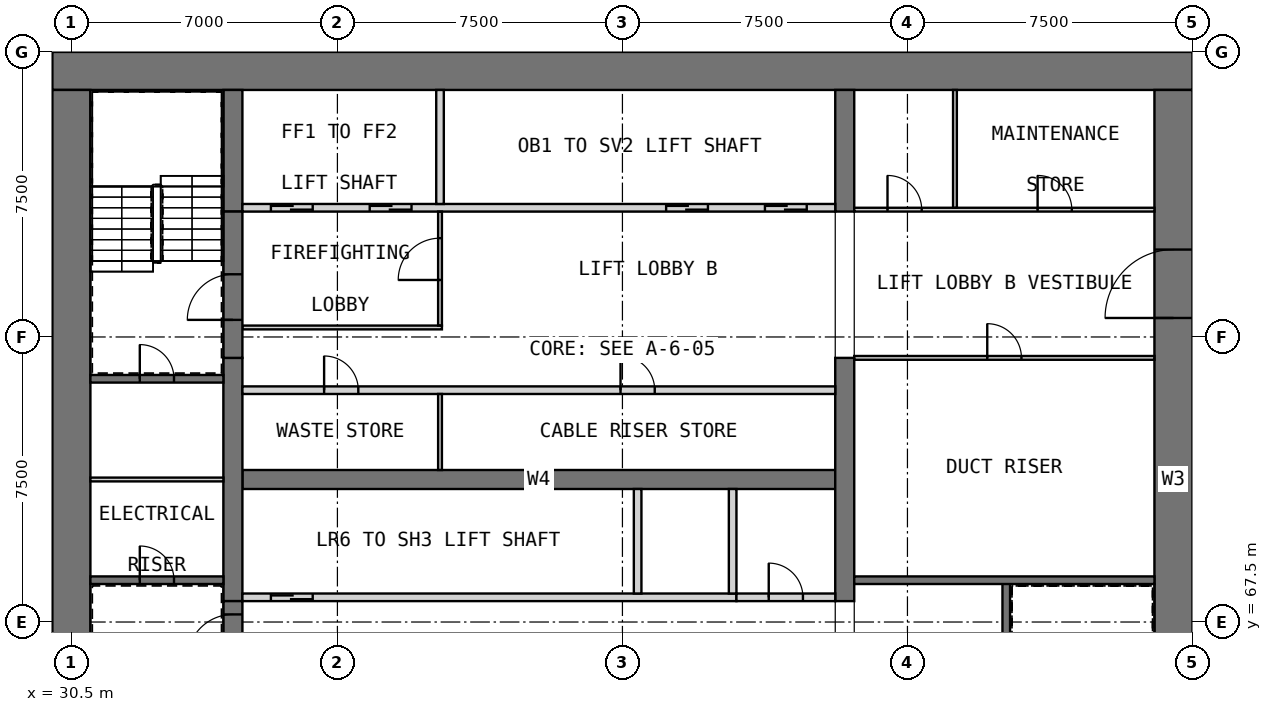
"""IFC4 building model, lengths in metres.
Left out: names, types, materials, properties, quantities, classifications, styles, units other than length and angle.
Written with IfcOpenShell. Run it as: python <this file> out.ifc"""

import sys

from ifc_helpers import new_model, si_unit, direction, frame, frame_2d, origin, place, context, subcontext, project, spatial, rectangle, extrude, element, fill, save


model = new_model("IFC4")
c1 = context("Model", 3, precision=1e-05, world=origin(), true_north=direction((0.0, 1.0)))
c2 = subcontext(c1, "Body", "Model", "MODEL_VIEW")
j1 = project(units=[si_unit("LENGTHUNIT", "METRE"), si_unit("PLANEANGLEUNIT", "RADIAN")], contexts=[c1])
p1 = place(None, origin())
s1 = spatial("IfcSite", under=j1, at=p1, CompositionType="ELEMENT")
p2 = place(p1, origin())
s2 = spatial("IfcBuilding", under=s1, at=p2, CompositionType="ELEMENT")
p3 = place(p2, frame((0.0, 0.0, 13.5)))
s3 = spatial("IfcBuildingStorey", under=s2, at=p3, CompositionType="ELEMENT", Elevation=13.5)
p4 = place(p3, frame((30.0, 82.0, 0.0), z_axis=(0.0, 0.0, 1.0), x_axis=(1.0, 0.0, 0.0)))
e1 = element("IfcWall", 1, at=p4, inside=s3, PredefinedType="SHEAR", context=c2, shape_type="SweptSolid", body=[
    extrude(rectangle(XDim=30.0, YDim=1.0, at=frame_2d((15.0, 0.0))), origin(), (0.0, 0.0, 1.0), 5.0),
])
p5 = place(p3, frame((30.5, 61.0, 0.0), z_axis=(0.0, 0.0, 1.0), x_axis=(0.0, 1.0, 0.0)))
e2 = element("IfcWall", 2, at=p5, inside=s3, PredefinedType="SHEAR", context=c2, shape_type="SweptSolid", body=[
    extrude(rectangle(XDim=20.5, YDim=1.0, at=frame_2d((10.25, 0.0))), origin(), (0.0, 0.0, 1.0), 5.0),
])
p6 = place(p3, frame((59.5, 61.0, 0.0), z_axis=(0.0, 0.0, 1.0), x_axis=(0.0, 1.0, 0.0)))
e3 = element("IfcWall", 3, at=p6, inside=s3, PredefinedType="SHEAR", context=c2, shape_type="SweptSolid", body=[
    extrude(rectangle(XDim=20.5, YDim=1.0, at=frame_2d((10.25, 0.0))), origin(), (0.0, 0.0, 1.0), 5.0),
])
p7 = place(p6, frame((14.5, 0.0, 0.0)))
e4 = element("IfcOpeningElement", 4, at=p7, cuts=e3, PredefinedType="OPENING", context=c2, shape_type="SweptSolid", body=[
    extrude(rectangle(XDim=1.8, YDim=2.1, at=frame_2d((0.9, 1.05))), frame((0.0, 0.51, 0.0), z_axis=(0.0, -1.0, 0.0), x_axis=(1.0, 0.0, 0.0)), (0.0, 0.0, 1.0), 1.02),
])
p8 = place(p3, frame((35.0, 71.25, 0.0), z_axis=(0.0, 0.0, 1.0), x_axis=(1.0, 0.0, 0.0)))
e5 = element("IfcWall", 5, at=p8, inside=s3, PredefinedType="SHEAR", context=c2, shape_type="SweptSolid", body=[
    extrude(rectangle(XDim=15.6, YDim=0.5, at=frame_2d((7.8, 0.0))), origin(), (0.0, 0.0, 1.0), 5.0),
])
p9 = place(p3, frame((34.75, 68.05, 0.0), z_axis=(0.0, 0.0, 1.0), x_axis=(0.0, 1.0, 0.0)))
e6 = element("IfcWall", 6, at=p9, inside=s3, PredefinedType="SHEAR", context=c2, shape_type="SweptSolid", body=[
    extrude(rectangle(XDim=6.4, YDim=0.5, at=frame_2d((3.2, 0.0))), origin(), (0.0, 0.0, 1.0), 5.0),
])
p10 = place(p3, frame((34.75, 78.3, 0.0), z_axis=(0.0, 0.0, 1.0), x_axis=(0.0, 1.0, 0.0)))
e7 = element("IfcWall", 7, at=p10, inside=s3, PredefinedType="SHEAR", context=c2, shape_type="SweptSolid", body=[
    extrude(rectangle(XDim=3.2, YDim=0.5, at=frame_2d((1.6, 0.0))), origin(), (0.0, 0.0, 1.0), 5.0),
])
p11 = place(p3, frame((50.85, 68.05, 0.0), z_axis=(0.0, 0.0, 1.0), x_axis=(0.0, 1.0, 0.0)))
e8 = element("IfcWall", 8, at=p11, inside=s3, PredefinedType="SHEAR", context=c2, shape_type="SweptSolid", body=[
    extrude(rectangle(XDim=6.4, YDim=0.5, at=frame_2d((3.2, 0.0))), origin(), (0.0, 0.0, 1.0), 5.0),
])
p12 = place(p3, frame((50.85, 78.3, 0.0), z_axis=(0.0, 0.0, 1.0), x_axis=(0.0, 1.0, 0.0)))
e9 = element("IfcWall", 9, at=p12, inside=s3, PredefinedType="SHEAR", context=c2, shape_type="SweptSolid", body=[
    extrude(rectangle(XDim=3.2, YDim=0.5, at=frame_2d((1.6, 0.0))), origin(), (0.0, 0.0, 1.0), 5.0),
])
p13 = place(p3, frame((35.0, 68.15, 0.0), z_axis=(0.0, 0.0, 1.0), x_axis=(1.0, 0.0, 0.0)))
e10 = element("IfcWall", 10, at=p13, inside=s3, PredefinedType="SOLIDWALL", context=c2, shape_type="SweptSolid", body=[
    extrude(rectangle(XDim=13.0, YDim=0.2, at=frame_2d((6.5, 0.0))), origin(), (0.0, 0.0, 1.0), 5.0),
])
p14 = place(p13, frame((0.75, 0.0, 0.0)))
e11 = element("IfcOpeningElement", 11, at=p14, cuts=e10, PredefinedType="OPENING", context=c2, shape_type="SweptSolid", body=[
    extrude(rectangle(XDim=1.1, YDim=2.1, at=frame_2d((0.55, 1.05))), frame((0.0, 0.11, 0.0), z_axis=(0.0, -1.0, 0.0), x_axis=(1.0, 0.0, 0.0)), (0.0, 0.0, 1.0), 0.22),
])
for number, where, z_axis, x_axis in (
    (12, (45.4, 68.25, 0.0), (0.0, 0.0, 1.0), (0.0, 1.0, 0.0)),
    (13, (47.9, 68.25, 0.0), (0.0, 0.0, 1.0), (0.0, 1.0, 0.0)),
):
    element("IfcWall", number, at=place(p3, frame(where, z_axis=z_axis, x_axis=x_axis)), inside=s3, PredefinedType="SOLIDWALL", context=c2, shape_type="SweptSolid", body=[
        extrude(rectangle(XDim=2.75, YDim=0.2, at=frame_2d((1.375, 0.0))), origin(), (0.0, 0.0, 1.0), 5.0),
    ])
p15 = place(p3, frame((48.0, 68.15, 0.0), z_axis=(0.0, 0.0, 1.0), x_axis=(1.0, 0.0, 0.0)))
e14 = element("IfcWall", 14, at=p15, inside=s3, PredefinedType="PARTITIONING", context=c2, shape_type="SweptSolid", body=[
    extrude(rectangle(XDim=2.6, YDim=0.2, at=frame_2d((1.3, 0.0))), origin(), (0.0, 0.0, 1.0), 4.7),
])
p16 = place(p15, frame((0.85, 0.0, 0.0)))
e15 = element("IfcOpeningElement", 15, at=p16, cuts=e14, PredefinedType="OPENING", context=c2, shape_type="SweptSolid", body=[
    extrude(rectangle(XDim=0.9, YDim=2.1, at=frame_2d((0.45, 1.05))), frame((0.0, 0.11, 0.0), z_axis=(0.0, -1.0, 0.0), x_axis=(1.0, 0.0, 0.0)), (0.0, 0.0, 1.0), 0.22),
])
p17 = place(p3, frame((35.0, 73.6, 0.0), z_axis=(0.0, 0.0, 1.0), x_axis=(1.0, 0.0, 0.0)))
e16 = element("IfcWall", 16, at=p17, inside=s3, PredefinedType="PARTITIONING", context=c2, shape_type="SweptSolid", body=[
    extrude(rectangle(XDim=15.6, YDim=0.2, at=frame_2d((7.8, 0.0))), origin(), (0.0, 0.0, 1.0), 4.7),
])
p18 = place(p17, frame((2.15, 0.0, 0.0)))
e17 = element("IfcOpeningElement", 17, at=p18, cuts=e16, PredefinedType="OPENING", context=c2, shape_type="SweptSolid", body=[
    extrude(rectangle(XDim=0.9, YDim=2.1, at=frame_2d((0.45, 1.05))), frame((0.0, 0.11, 0.0), z_axis=(0.0, -1.0, 0.0), x_axis=(1.0, 0.0, 0.0)), (0.0, 0.0, 1.0), 0.22),
])
p19 = place(p17, frame((9.95, 0.0, 0.0)))
e18 = element("IfcOpeningElement", 18, at=p19, cuts=e16, PredefinedType="OPENING", context=c2, shape_type="SweptSolid", body=[
    extrude(rectangle(XDim=0.9, YDim=2.1, at=frame_2d((0.45, 1.05))), frame((0.0, 0.11, 0.0), z_axis=(0.0, -1.0, 0.0), x_axis=(1.0, 0.0, 0.0)), (0.0, 0.0, 1.0), 0.22),
])
p20 = place(p3, frame((40.2, 71.5, 0.0), z_axis=(0.0, 0.0, 1.0), x_axis=(0.0, 1.0, 0.0)))
e19 = element("IfcWall", 19, at=p20, inside=s3, PredefinedType="PARTITIONING", context=c2, shape_type="SweptSolid", body=[
    extrude(rectangle(XDim=2.0, YDim=0.1, at=frame_2d((1.0, 0.0))), origin(), (0.0, 0.0, 1.0), 4.7),
])
p21 = place(p3, frame((35.0, 78.4, 0.0), z_axis=(0.0, 0.0, 1.0), x_axis=(1.0, 0.0, 0.0)))
e20 = element("IfcWall", 20, at=p21, inside=s3, PredefinedType="SOLIDWALL", context=c2, shape_type="SweptSolid", body=[
    extrude(rectangle(XDim=15.6, YDim=0.2, at=frame_2d((7.8, 0.0))), origin(), (0.0, 0.0, 1.0), 5.0),
])
p22 = place(p21, frame((0.75, 0.0, 0.0)))
e21 = element("IfcOpeningElement", 21, at=p22, cuts=e20, PredefinedType="OPENING", context=c2, shape_type="SweptSolid", body=[
    extrude(rectangle(XDim=1.1, YDim=2.1, at=frame_2d((0.55, 1.05))), frame((0.0, 0.11, 0.0), z_axis=(0.0, -1.0, 0.0), x_axis=(1.0, 0.0, 0.0)), (0.0, 0.0, 1.0), 0.22),
])
p23 = place(p21, frame((3.35, 0.0, 0.0)))
e22 = element("IfcOpeningElement", 22, at=p23, cuts=e20, PredefinedType="OPENING", context=c2, shape_type="SweptSolid", body=[
    extrude(rectangle(XDim=1.1, YDim=2.1, at=frame_2d((0.55, 1.05))), frame((0.0, 0.11, 0.0), z_axis=(0.0, -1.0, 0.0), x_axis=(1.0, 0.0, 0.0)), (0.0, 0.0, 1.0), 0.22),
])
p24 = place(p21, frame((11.15, 0.0, 0.0)))
e23 = element("IfcOpeningElement", 23, at=p24, cuts=e20, PredefinedType="OPENING", context=c2, shape_type="SweptSolid", body=[
    extrude(rectangle(XDim=1.1, YDim=2.1, at=frame_2d((0.55, 1.05))), frame((0.0, 0.11, 0.0), z_axis=(0.0, -1.0, 0.0), x_axis=(1.0, 0.0, 0.0)), (0.0, 0.0, 1.0), 0.22),
])
p25 = place(p21, frame((13.75, 0.0, 0.0)))
e24 = element("IfcOpeningElement", 24, at=p25, cuts=e20, PredefinedType="OPENING", context=c2, shape_type="SweptSolid", body=[
    extrude(rectangle(XDim=1.1, YDim=2.1, at=frame_2d((0.55, 1.05))), frame((0.0, 0.11, 0.0), z_axis=(0.0, -1.0, 0.0), x_axis=(1.0, 0.0, 0.0)), (0.0, 0.0, 1.0), 0.22),
])
p26 = place(p3, frame((40.2, 78.5, 0.0), z_axis=(0.0, 0.0, 1.0), x_axis=(0.0, 1.0, 0.0)))
e25 = element("IfcWall", 25, at=p26, inside=s3, PredefinedType="SOLIDWALL", context=c2, shape_type="SweptSolid", body=[
    extrude(rectangle(XDim=3.0, YDim=0.2, at=frame_2d((1.5, 0.0))), origin(), (0.0, 0.0, 1.0), 5.0),
])
p27 = place(p3, frame((35.0, 75.25, 0.0), z_axis=(0.0, 0.0, 1.0), x_axis=(1.0, 0.0, 0.0)))
e26 = element("IfcWall", 26, at=p27, inside=s3, PredefinedType="PARTITIONING", context=c2, shape_type="SweptSolid", body=[
    extrude(rectangle(XDim=5.25, YDim=0.1, at=frame_2d((2.625, 0.0))), origin(), (0.0, 0.0, 1.0), 4.7),
])
p28 = place(p3, frame((40.2, 75.3, 0.0), z_axis=(0.0, 0.0, 1.0), x_axis=(0.0, 1.0, 0.0)))
e27 = element("IfcWall", 27, at=p28, inside=s3, PredefinedType="PARTITIONING", context=c2, shape_type="SweptSolid", body=[
    extrude(rectangle(XDim=3.0, YDim=0.1, at=frame_2d((1.5, 0.0))), origin(), (0.0, 0.0, 1.0), 4.7),
])
p29 = place(p28, frame((1.2, 0.0, 0.0)))
e28 = element("IfcOpeningElement", 28, at=p29, cuts=e27, PredefinedType="OPENING", context=c2, shape_type="SweptSolid", body=[
    extrude(rectangle(XDim=1.1, YDim=2.1, at=frame_2d((0.55, 1.05))), frame((0.0, 0.06, 0.0), z_axis=(0.0, -1.0, 0.0), x_axis=(1.0, 0.0, 0.0)), (0.0, 0.0, 1.0), 0.12),
])
p30 = place(p3, frame((34.75, 64.2, 0.0), z_axis=(0.0, 0.0, 1.0), x_axis=(0.0, 1.0, 0.0)))
e29 = element("IfcWall", 29, at=p30, inside=s3, PredefinedType="SOLIDWALL", context=c2, shape_type="SweptSolid", body=[
    extrude(rectangle(XDim=3.85, YDim=0.5, at=frame_2d((1.925, 0.0))), origin(), (0.0, 0.0, 1.0), 3.8),
])
p31 = place(p30, frame((2.3, 0.0, 0.0)))
e30 = element("IfcOpeningElement", 30, at=p31, cuts=e29, PredefinedType="OPENING", context=c2, shape_type="SweptSolid", body=[
    extrude(rectangle(XDim=1.2, YDim=2.1, at=frame_2d((0.6, 1.05))), frame((0.0, 0.26, 0.0), z_axis=(0.0, -1.0, 0.0), x_axis=(1.0, 0.0, 0.0)), (0.0, 0.0, 1.0), 0.52),
])
p32 = place(p3, frame((34.75, 74.45, 0.0), z_axis=(0.0, 0.0, 1.0), x_axis=(0.0, 1.0, 0.0)))
e31 = element("IfcWall", 31, at=p32, inside=s3, PredefinedType="SOLIDWALL", context=c2, shape_type="SweptSolid", body=[
    extrude(rectangle(XDim=3.85, YDim=0.5, at=frame_2d((1.925, 0.0))), origin(), (0.0, 0.0, 1.0), 3.8),
])
p33 = place(p32, frame((1.0, 0.0, 0.0)))
e32 = element("IfcOpeningElement", 32, at=p33, cuts=e31, PredefinedType="OPENING", context=c2, shape_type="SweptSolid", body=[
    extrude(rectangle(XDim=1.2, YDim=2.1, at=frame_2d((0.6, 1.05))), frame((0.0, 0.26, 0.0), z_axis=(0.0, -1.0, 0.0), x_axis=(1.0, 0.0, 0.0)), (0.0, 0.0, 1.0), 0.52),
])
p34 = place(p3, frame((31.0, 68.6, 0.0), z_axis=(0.0, 0.0, 1.0), x_axis=(1.0, 0.0, 0.0)))
e33 = element("IfcWall", 33, at=p34, inside=s3, PredefinedType="SOLIDWALL", context=c2, shape_type="SweptSolid", body=[
    extrude(rectangle(XDim=3.5, YDim=0.2, at=frame_2d((1.75, 0.0))), origin(), (0.0, 0.0, 1.0), 4.7),
])
p35 = place(p34, frame((1.3, 0.0, 0.0)))
e34 = element("IfcOpeningElement", 34, at=p35, cuts=e33, PredefinedType="OPENING", context=c2, shape_type="SweptSolid", body=[
    extrude(rectangle(XDim=0.9, YDim=2.1, at=frame_2d((0.45, 1.05))), frame((0.0, 0.11, 0.0), z_axis=(0.0, -1.0, 0.0), x_axis=(1.0, 0.0, 0.0)), (0.0, 0.0, 1.0), 0.22),
])
p36 = place(p3, frame((31.0, 73.9, 0.0), z_axis=(0.0, 0.0, 1.0), x_axis=(1.0, 0.0, 0.0)))
e35 = element("IfcWall", 35, at=p36, inside=s3, PredefinedType="SOLIDWALL", context=c2, shape_type="SweptSolid", body=[
    extrude(rectangle(XDim=3.5, YDim=0.2, at=frame_2d((1.75, 0.0))), origin(), (0.0, 0.0, 1.0), 4.7),
])
p37 = place(p36, frame((1.3, 0.0, 0.0)))
e36 = element("IfcOpeningElement", 36, at=p37, cuts=e35, PredefinedType="OPENING", context=c2, shape_type="SweptSolid", body=[
    extrude(rectangle(XDim=0.9, YDim=2.1, at=frame_2d((0.45, 1.05))), frame((0.0, 0.11, 0.0), z_axis=(0.0, -1.0, 0.0), x_axis=(1.0, 0.0, 0.0)), (0.0, 0.0, 1.0), 0.22),
])
p38 = place(p3, frame((55.1, 61.0, 0.0), z_axis=(0.0, 0.0, 1.0), x_axis=(0.0, 1.0, 0.0)))
e37 = element("IfcWall", 37, at=p38, inside=s3, PredefinedType="SOLIDWALL", context=c2, shape_type="SweptSolid", body=[
    extrude(rectangle(XDim=7.6, YDim=0.2, at=frame_2d((3.8, 0.0))), origin(), (0.0, 0.0, 1.0), 4.7),
])
p39 = place(p3, frame((51.1, 68.6, 0.0), z_axis=(0.0, 0.0, 1.0), x_axis=(1.0, 0.0, 0.0)))
e38 = element("IfcWall", 38, at=p39, inside=s3, PredefinedType="SOLIDWALL", context=c2, shape_type="SweptSolid", body=[
    extrude(rectangle(XDim=7.9, YDim=0.2, at=frame_2d((3.95, 0.0))), origin(), (0.0, 0.0, 1.0), 4.7),
])
p40 = place(p3, frame((31.0, 71.25, 0.0), z_axis=(0.0, 0.0, 1.0), x_axis=(1.0, 0.0, 0.0)))
e39 = element("IfcWall", 39, at=p40, inside=s3, PredefinedType="PARTITIONING", context=c2, shape_type="SweptSolid", body=[
    extrude(rectangle(XDim=3.5, YDim=0.1, at=frame_2d((1.75, 0.0))), origin(), (0.0, 0.0, 1.0), 4.7),
])
p41 = place(p3, frame((51.1, 74.45, 0.0), z_axis=(0.0, 0.0, 1.0), x_axis=(1.0, 0.0, 0.0)))
e40 = element("IfcWall", 40, at=p41, inside=s3, PredefinedType="PARTITIONING", context=c2, shape_type="SweptSolid", body=[
    extrude(rectangle(XDim=7.9, YDim=0.1, at=frame_2d((3.95, 0.0))), origin(), (0.0, 0.0, 1.0), 4.7),
])
p42 = place(p41, frame((3.5, 0.0, 0.0)))
e41 = element("IfcOpeningElement", 41, at=p42, cuts=e40, PredefinedType="OPENING", context=c2, shape_type="SweptSolid", body=[
    extrude(rectangle(XDim=0.9, YDim=2.1, at=frame_2d((0.45, 1.05))), frame((0.0, 0.06, 0.0), z_axis=(0.0, -1.0, 0.0), x_axis=(1.0, 0.0, 0.0)), (0.0, 0.0, 1.0), 0.12),
])
p43 = place(p3, frame((51.1, 78.35, 0.0), z_axis=(0.0, 0.0, 1.0), x_axis=(1.0, 0.0, 0.0)))
e42 = element("IfcWall", 42, at=p43, inside=s3, PredefinedType="PARTITIONING", context=c2, shape_type="SweptSolid", body=[
    extrude(rectangle(XDim=7.9, YDim=0.1, at=frame_2d((3.95, 0.0))), origin(), (0.0, 0.0, 1.0), 4.7),
])
p44 = place(p43, frame((0.875, 0.0, 0.0)))
e43 = element("IfcOpeningElement", 43, at=p44, cuts=e42, PredefinedType="OPENING", context=c2, shape_type="SweptSolid", body=[
    extrude(rectangle(XDim=0.9, YDim=2.1, at=frame_2d((0.45, 1.05))), frame((0.0, 0.06, 0.0), z_axis=(0.0, -1.0, 0.0), x_axis=(1.0, 0.0, 0.0)), (0.0, 0.0, 1.0), 0.12),
])
p45 = place(p43, frame((4.825, 0.0, 0.0)))
e44 = element("IfcOpeningElement", 44, at=p45, cuts=e42, PredefinedType="OPENING", context=c2, shape_type="SweptSolid", body=[
    extrude(rectangle(XDim=0.9, YDim=2.1, at=frame_2d((0.45, 1.05))), frame((0.0, 0.06, 0.0), z_axis=(0.0, -1.0, 0.0), x_axis=(1.0, 0.0, 0.0)), (0.0, 0.0, 1.0), 0.12),
])
p46 = place(p3, frame((53.75, 78.4, 0.0), z_axis=(0.0, 0.0, 1.0), x_axis=(0.0, 1.0, 0.0)))
e45 = element("IfcWall", 45, at=p46, inside=s3, PredefinedType="PARTITIONING", context=c2, shape_type="SweptSolid", body=[
    extrude(rectangle(XDim=3.1, YDim=0.1, at=frame_2d((1.55, 0.0))), origin(), (0.0, 0.0, 1.0), 4.7),
])
p47 = place(p14, origin())
e46 = element("IfcDoor", 46, at=p47, inside=s3, OperationType="DOUBLE_DOOR_SLIDING", PredefinedType="DOOR", context=c2, shape_type="SweptSolid", body=[
    extrude(rectangle(XDim=1.1, YDim=2.1, at=frame_2d((0.55, 1.05))), frame((0.0, 0.025, 0.0), z_axis=(0.0, -1.0, 0.0), x_axis=(1.0, 0.0, 0.0)), (0.0, 0.0, 1.0), 0.05),
])
fill(e11, e46)
p48 = place(p16, origin())
e47 = element("IfcDoor", 47, at=p48, inside=s3, OperationType="SINGLE_SWING_RIGHT", PredefinedType="DOOR", context=c2, shape_type="SweptSolid", body=[
    extrude(rectangle(XDim=0.9, YDim=2.1, at=frame_2d((0.45, 1.05))), frame((0.0, 0.025, 0.0), z_axis=(0.0, -1.0, 0.0), x_axis=(1.0, 0.0, 0.0)), (0.0, 0.0, 1.0), 0.05),
])
fill(e15, e47)
p49 = place(p18, origin())
e48 = element("IfcDoor", 48, at=p49, inside=s3, OperationType="SINGLE_SWING_RIGHT", PredefinedType="DOOR", context=c2, shape_type="SweptSolid", body=[
    extrude(rectangle(XDim=0.9, YDim=2.1, at=frame_2d((0.45, 1.05))), frame((0.0, 0.025, 0.0), z_axis=(0.0, -1.0, 0.0), x_axis=(1.0, 0.0, 0.0)), (0.0, 0.0, 1.0), 0.05),
])
fill(e17, e48)
p50 = place(p19, origin())
e49 = element("IfcDoor", 49, at=p50, inside=s3, OperationType="SINGLE_SWING_LEFT", PredefinedType="DOOR", context=c2, shape_type="SweptSolid", body=[
    extrude(rectangle(XDim=0.9, YDim=2.1, at=frame_2d((0.45, 1.05))), frame((0.0, 0.025, 0.0), z_axis=(0.0, -1.0, 0.0), x_axis=(1.0, 0.0, 0.0)), (0.0, 0.0, 1.0), 0.05),
])
fill(e18, e49)
p51 = place(p22, origin())
e50 = element("IfcDoor", 50, at=p51, inside=s3, OperationType="DOUBLE_DOOR_SLIDING", PredefinedType="DOOR", context=c2, shape_type="SweptSolid", body=[
    extrude(rectangle(XDim=1.1, YDim=2.1, at=frame_2d((0.55, 1.05))), frame((0.0, 0.025, 0.0), z_axis=(0.0, -1.0, 0.0), x_axis=(1.0, 0.0, 0.0)), (0.0, 0.0, 1.0), 0.05),
])
fill(e21, e50)
p52 = place(p23, origin())
e51 = element("IfcDoor", 51, at=p52, inside=s3, OperationType="DOUBLE_DOOR_SLIDING", PredefinedType="DOOR", context=c2, shape_type="SweptSolid", body=[
    extrude(rectangle(XDim=1.1, YDim=2.1, at=frame_2d((0.55, 1.05))), frame((0.0, 0.025, 0.0), z_axis=(0.0, -1.0, 0.0), x_axis=(1.0, 0.0, 0.0)), (0.0, 0.0, 1.0), 0.05),
])
fill(e22, e51)
p53 = place(p24, origin())
e52 = element("IfcDoor", 52, at=p53, inside=s3, OperationType="DOUBLE_DOOR_SLIDING", PredefinedType="DOOR", context=c2, shape_type="SweptSolid", body=[
    extrude(rectangle(XDim=1.1, YDim=2.1, at=frame_2d((0.55, 1.05))), frame((0.0, 0.025, 0.0), z_axis=(0.0, -1.0, 0.0), x_axis=(1.0, 0.0, 0.0)), (0.0, 0.0, 1.0), 0.05),
])
fill(e23, e52)
p54 = place(p25, origin())
e53 = element("IfcDoor", 53, at=p54, inside=s3, OperationType="DOUBLE_DOOR_SLIDING", PredefinedType="DOOR", context=c2, shape_type="SweptSolid", body=[
    extrude(rectangle(XDim=1.1, YDim=2.1, at=frame_2d((0.55, 1.05))), frame((0.0, 0.025, 0.0), z_axis=(0.0, -1.0, 0.0), x_axis=(1.0, 0.0, 0.0)), (0.0, 0.0, 1.0), 0.05),
])
fill(e24, e53)
p55 = place(p7, origin())
e54 = element("IfcDoor", 54, at=p55, inside=s3, OperationType="DOUBLE_DOOR_SINGLE_SWING", PredefinedType="DOOR", context=c2, shape_type="SweptSolid", body=[
    extrude(rectangle(XDim=1.8, YDim=2.1, at=frame_2d((0.9, 1.05))), frame((0.0, 0.025, 0.0), z_axis=(0.0, -1.0, 0.0), x_axis=(1.0, 0.0, 0.0)), (0.0, 0.0, 1.0), 0.05),
])
fill(e4, e54)
p56 = place(p29, origin())
e55 = element("IfcDoor", 55, at=p56, inside=s3, OperationType="SINGLE_SWING_LEFT", PredefinedType="DOOR", context=c2, shape_type="SweptSolid", body=[
    extrude(rectangle(XDim=1.1, YDim=2.1, at=frame_2d((0.55, 1.05))), frame((0.0, 0.025, 0.0), z_axis=(0.0, -1.0, 0.0), x_axis=(1.0, 0.0, 0.0)), (0.0, 0.0, 1.0), 0.05),
])
fill(e28, e55)
p57 = place(p31, origin())
e56 = element("IfcDoor", 56, at=p57, inside=s3, OperationType="SINGLE_SWING_LEFT", PredefinedType="DOOR", context=c2, shape_type="SweptSolid", body=[
    extrude(rectangle(XDim=1.2, YDim=2.1, at=frame_2d((0.6, 1.05))), frame((0.0, 0.025, 0.0), z_axis=(0.0, -1.0, 0.0), x_axis=(1.0, 0.0, 0.0)), (0.0, 0.0, 1.0), 0.05),
])
fill(e30, e56)
p58 = place(p33, origin())
e57 = element("IfcDoor", 57, at=p58, inside=s3, OperationType="SINGLE_SWING_RIGHT", PredefinedType="DOOR", context=c2, shape_type="SweptSolid", body=[
    extrude(rectangle(XDim=1.2, YDim=2.1, at=frame_2d((0.6, 1.05))), frame((0.0, 0.025, 0.0), z_axis=(0.0, -1.0, 0.0), x_axis=(1.0, 0.0, 0.0)), (0.0, 0.0, 1.0), 0.05),
])
fill(e32, e57)
p59 = place(p35, origin())
e58 = element("IfcDoor", 58, at=p59, inside=s3, OperationType="SINGLE_SWING_LEFT", PredefinedType="DOOR", context=c2, shape_type="SweptSolid", body=[
    extrude(rectangle(XDim=0.9, YDim=2.1, at=frame_2d((0.45, 1.05))), frame((0.0, 0.025, 0.0), z_axis=(0.0, -1.0, 0.0), x_axis=(1.0, 0.0, 0.0)), (0.0, 0.0, 1.0), 0.05),
])
fill(e34, e58)
p60 = place(p37, origin())
e59 = element("IfcDoor", 59, at=p60, inside=s3, OperationType="SINGLE_SWING_RIGHT", PredefinedType="DOOR", context=c2, shape_type="SweptSolid", body=[
    extrude(rectangle(XDim=0.9, YDim=2.1, at=frame_2d((0.45, 1.05))), frame((0.0, 0.025, 0.0), z_axis=(0.0, -1.0, 0.0), x_axis=(1.0, 0.0, 0.0)), (0.0, 0.0, 1.0), 0.05),
])
fill(e36, e59)
p61 = place(p42, origin())
e60 = element("IfcDoor", 60, at=p61, inside=s3, OperationType="SINGLE_SWING_RIGHT", PredefinedType="DOOR", context=c2, shape_type="SweptSolid", body=[
    extrude(rectangle(XDim=0.9, YDim=2.1, at=frame_2d((0.45, 1.05))), frame((0.0, 0.025, 0.0), z_axis=(0.0, -1.0, 0.0), x_axis=(1.0, 0.0, 0.0)), (0.0, 0.0, 1.0), 0.05),
])
fill(e41, e60)
p62 = place(p44, origin())
e61 = element("IfcDoor", 61, at=p62, inside=s3, OperationType="SINGLE_SWING_RIGHT", PredefinedType="DOOR", context=c2, shape_type="SweptSolid", body=[
    extrude(rectangle(XDim=0.9, YDim=2.1, at=frame_2d((0.45, 1.05))), frame((0.0, 0.025, 0.0), z_axis=(0.0, -1.0, 0.0), x_axis=(1.0, 0.0, 0.0)), (0.0, 0.0, 1.0), 0.05),
])
fill(e43, e61)
p63 = place(p45, origin())
e62 = element("IfcDoor", 62, at=p63, inside=s3, OperationType="SINGLE_SWING_LEFT", PredefinedType="DOOR", context=c2, shape_type="SweptSolid", body=[
    extrude(rectangle(XDim=0.9, YDim=2.1, at=frame_2d((0.45, 1.05))), frame((0.0, 0.025, 0.0), z_axis=(0.0, -1.0, 0.0), x_axis=(1.0, 0.0, 0.0)), (0.0, 0.0, 1.0), 0.05),
])
fill(e44, e62)
save(model, sys.argv[1])
